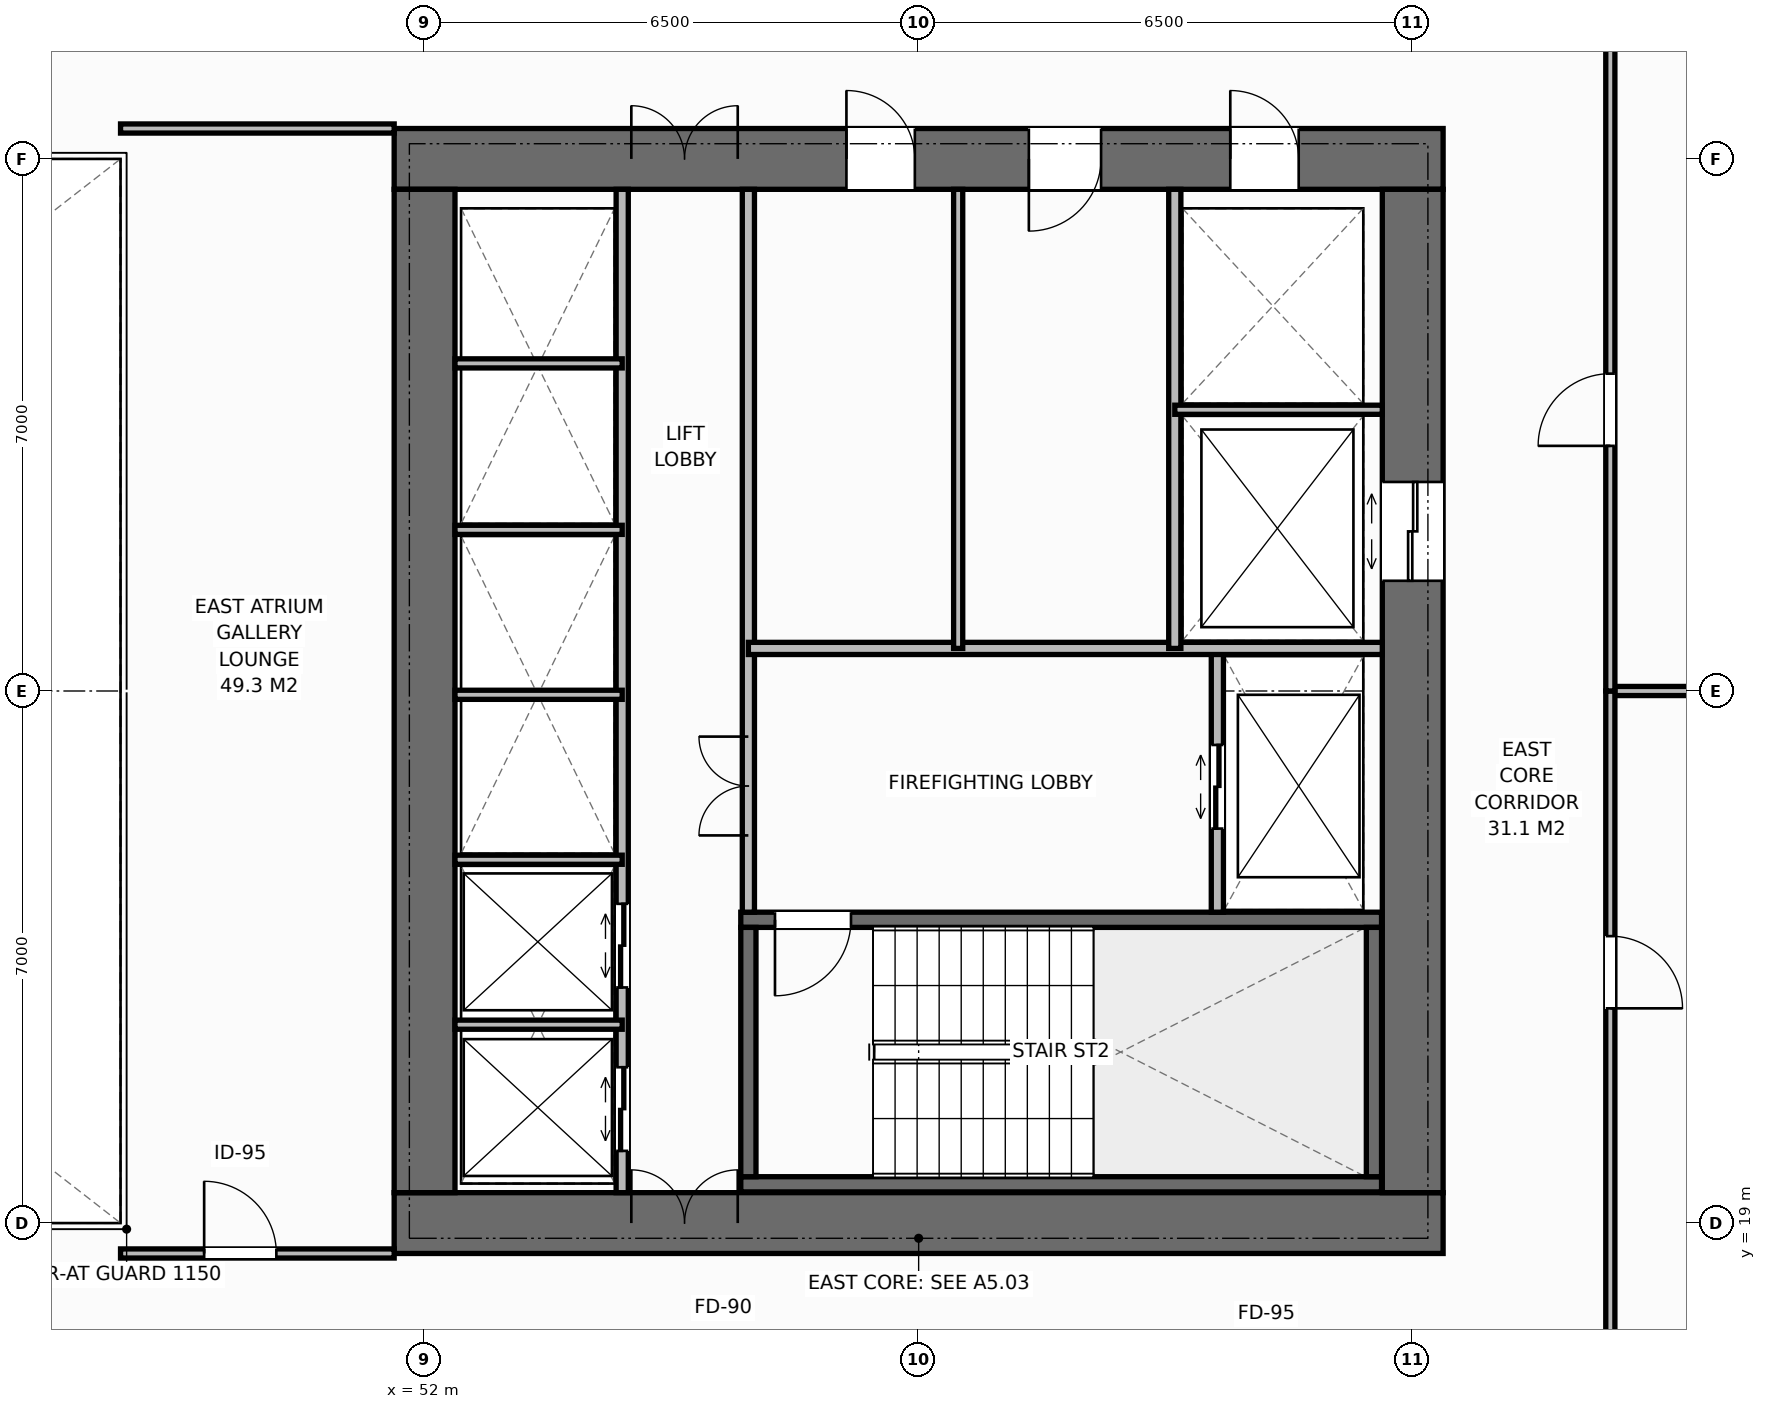
"""IFC4 building model, lengths in metres.
Left out: names, types, materials, properties, quantities, classifications, styles, units other than length and angle.
Written with IfcOpenShell. Run it as: python <this file> out.ifc"""

import sys

from ifc_helpers import new_model, si_unit, direction, frame, frame_2d, origin, place, context, subcontext, project, spatial, rectangle, extrude, element, fill, save


model = new_model("IFC4")
c1 = context("Model", 3, precision=1e-05, world=origin(), true_north=direction((0.0, 1.0)))
c2 = subcontext(c1, "Body", "Model", "MODEL_VIEW")
j1 = project(units=[si_unit("LENGTHUNIT", "METRE"), si_unit("PLANEANGLEUNIT", "RADIAN")], contexts=[c1])
p1 = place(None, origin())
s1 = spatial("IfcSite", under=j1, at=p1, CompositionType="ELEMENT")
p2 = place(p1, origin())
s2 = spatial("IfcBuilding", under=s1, at=p2, CompositionType="ELEMENT")
p3 = place(p2, frame((0.0, 0.0, 65.8)))
s3 = spatial("IfcBuildingStorey", under=s2, at=p3, CompositionType="ELEMENT", Elevation=65.8)
p4 = place(p3, frame((51.6, 19.0, 0.0), z_axis=(0.0, 0.0, 1.0), x_axis=(1.0, 0.0, 0.0)))
e1 = element("IfcWall", 1, at=p4, inside=s3, PredefinedType="SHEAR", context=c2, shape_type="SweptSolid", body=[
    extrude(rectangle(XDim=13.8, YDim=0.8, at=frame_2d((6.9, 0.0))), origin(), (0.0, 0.0, 1.0), 3.8),
])
p5 = place(p4, frame((3.12, 0.0, 0.0)))
e2 = element("IfcOpeningElement", 2, at=p5, cuts=e1, PredefinedType="OPENING", context=c2, shape_type="SweptSolid", body=[
    extrude(rectangle(XDim=1.4, YDim=2.2, at=frame_2d((0.7, 1.1))), frame((0.0, 0.41, 0.0), z_axis=(0.0, -1.0, 0.0), x_axis=(1.0, 0.0, 0.0)), (0.0, 0.0, 1.0), 0.82),
])
p6 = place(p3, frame((51.6, 33.0, 0.0), z_axis=(0.0, 0.0, 1.0), x_axis=(1.0, 0.0, 0.0)))
e3 = element("IfcWall", 3, at=p6, inside=s3, PredefinedType="SHEAR", context=c2, shape_type="SweptSolid", body=[
    extrude(rectangle(XDim=13.8, YDim=0.8, at=frame_2d((6.9, 0.0))), origin(), (0.0, 0.0, 1.0), 3.8),
])
p7 = place(p6, frame((3.12, 0.0, 0.0)))
e4 = element("IfcOpeningElement", 4, at=p7, cuts=e3, PredefinedType="OPENING", context=c2, shape_type="SweptSolid", body=[
    extrude(rectangle(XDim=1.4, YDim=2.2, at=frame_2d((0.7, 1.1))), frame((0.0, 0.41, 0.0), z_axis=(0.0, -1.0, 0.0), x_axis=(1.0, 0.0, 0.0)), (0.0, 0.0, 1.0), 0.82),
])
p8 = place(p6, frame((11.0, 0.0, 0.0)))
e5 = element("IfcOpeningElement", 5, at=p8, cuts=e3, PredefinedType="OPENING", context=c2, shape_type="SweptSolid", body=[
    extrude(rectangle(XDim=0.9, YDim=2.15, at=frame_2d((0.45, 1.075))), frame((0.0, 0.41, 0.0), z_axis=(0.0, -1.0, 0.0), x_axis=(1.0, 0.0, 0.0)), (0.0, 0.0, 1.0), 0.82),
])
p9 = place(p6, frame((5.95, 0.0, 0.0)))
e6 = element("IfcOpeningElement", 6, at=p9, cuts=e3, PredefinedType="OPENING", context=c2, shape_type="SweptSolid", body=[
    extrude(rectangle(XDim=0.9, YDim=2.15, at=frame_2d((0.45, 1.075))), frame((0.0, 0.41, 0.0), z_axis=(0.0, -1.0, 0.0), x_axis=(1.0, 0.0, 0.0)), (0.0, 0.0, 1.0), 0.82),
])
p10 = place(p6, frame((8.35, 0.0, 0.0)))
e7 = element("IfcOpeningElement", 7, at=p10, cuts=e3, PredefinedType="OPENING", context=c2, shape_type="SweptSolid", body=[
    extrude(rectangle(XDim=0.95, YDim=2.15, at=frame_2d((0.475, 1.075))), frame((0.0, 0.41, 0.0), z_axis=(0.0, -1.0, 0.0), x_axis=(1.0, 0.0, 0.0)), (0.0, 0.0, 1.0), 0.82),
])
p11 = place(p3, frame((52.0, 19.4, 0.0), z_axis=(0.0, 0.0, 1.0), x_axis=(0.0, 1.0, 0.0)))
e8 = element("IfcWall", 8, at=p11, inside=s3, PredefinedType="SHEAR", context=c2, shape_type="SweptSolid", body=[
    extrude(rectangle(XDim=13.2, YDim=0.8, at=frame_2d((6.6, 0.0))), origin(), (0.0, 0.0, 1.0), 3.8),
])
p12 = place(p3, frame((65.0, 19.4, 0.0), z_axis=(0.0, 0.0, 1.0), x_axis=(0.0, 1.0, 0.0)))
e9 = element("IfcWall", 9, at=p12, inside=s3, PredefinedType="SHEAR", context=c2, shape_type="SweptSolid", body=[
    extrude(rectangle(XDim=13.2, YDim=0.8, at=frame_2d((6.6, 0.0))), origin(), (0.0, 0.0, 1.0), 3.8),
])
p13 = place(p12, frame((8.05, 0.0, 0.0)))
e10 = element("IfcOpeningElement", 10, at=p13, cuts=e9, PredefinedType="OPENING", context=c2, shape_type="SweptSolid", body=[
    extrude(rectangle(XDim=1.3, YDim=2.2, at=frame_2d((0.65, 1.1))), frame((0.0, 0.41, 0.0), z_axis=(0.0, -1.0, 0.0), x_axis=(1.0, 0.0, 0.0)), (0.0, 0.0, 1.0), 0.82),
])
p14 = place(p3, frame((56.16, 19.51, 0.0), z_axis=(0.0, 0.0, 1.0), x_axis=(1.0, 0.0, 0.0)))
e11 = element("IfcWall", 11, at=p14, inside=s3, PredefinedType="SHEAR", context=c2, shape_type="SweptSolid", body=[
    extrude(rectangle(XDim=8.43, YDim=0.2, at=frame_2d((4.215, 0.0))), origin(), (0.0, 0.0, 1.0), 3.8),
])
p15 = place(p3, frame((56.16, 22.99, 0.0), z_axis=(0.0, 0.0, 1.0), x_axis=(1.0, 0.0, 0.0)))
e12 = element("IfcWall", 12, at=p15, inside=s3, PredefinedType="SHEAR", context=c2, shape_type="SweptSolid", body=[
    extrude(rectangle(XDim=8.43, YDim=0.2, at=frame_2d((4.215, 0.0))), origin(), (0.0, 0.0, 1.0), 3.8),
])
p16 = place(p15, frame((0.45, 0.0, 0.0)))
e13 = element("IfcOpeningElement", 13, at=p16, cuts=e12, PredefinedType="OPENING", context=c2, shape_type="SweptSolid", body=[
    extrude(rectangle(XDim=1.0, YDim=2.15, at=frame_2d((0.5, 1.075))), frame((0.0, 0.11, 0.0), z_axis=(0.0, -1.0, 0.0), x_axis=(1.0, 0.0, 0.0)), (0.0, 0.0, 1.0), 0.22),
])
for number, where, z_axis, x_axis in (
    (14, (56.26, 19.61, 0.0), (0.0, 0.0, 1.0), (0.0, 1.0, 0.0)),
    (15, (64.49, 19.61, 0.0), (0.0, 0.0, 1.0), (0.0, 1.0, 0.0)),
):
    element("IfcWall", number, at=place(p3, frame(where, z_axis=z_axis, x_axis=x_axis)), inside=s3, PredefinedType="SHEAR", context=c2, shape_type="SweptSolid", body=[
        extrude(rectangle(XDim=3.28, YDim=0.2, at=frame_2d((1.64, 0.0))), origin(), (0.0, 0.0, 1.0), 3.8),
    ])
p17 = place(p3, frame((54.6, 19.4, 0.0), z_axis=(0.0, 0.0, 1.0), x_axis=(0.0, 1.0, 0.0)))
e16 = element("IfcWall", 16, at=p17, inside=s3, PredefinedType="STANDARD", context=c2, shape_type="SweptSolid", body=[
    extrude(rectangle(XDim=13.2, YDim=0.16, at=frame_2d((6.6, 0.0))), origin(), (0.0, 0.0, 1.0), 3.55),
])
p18 = place(p17, frame((0.55, 0.0, 0.0)))
e17 = element("IfcOpeningElement", 17, at=p18, cuts=e16, PredefinedType="OPENING", context=c2, shape_type="SweptSolid", body=[
    extrude(rectangle(XDim=1.1, YDim=2.2, at=frame_2d((0.55, 1.1))), frame((0.0, 0.09, 0.0), z_axis=(0.0, -1.0, 0.0), x_axis=(1.0, 0.0, 0.0)), (0.0, 0.0, 1.0), 0.18),
])
p19 = place(p17, frame((2.7, 0.0, 0.0)))
e18 = element("IfcOpeningElement", 18, at=p19, cuts=e16, PredefinedType="OPENING", context=c2, shape_type="SweptSolid", body=[
    extrude(rectangle(XDim=1.1, YDim=2.2, at=frame_2d((0.55, 1.1))), frame((0.0, 0.09, 0.0), z_axis=(0.0, -1.0, 0.0), x_axis=(1.0, 0.0, 0.0)), (0.0, 0.0, 1.0), 0.18),
])
p20 = place(p3, frame((56.26, 23.09, 0.0), z_axis=(0.0, 0.0, 1.0), x_axis=(0.0, 1.0, 0.0)))
e19 = element("IfcWall", 19, at=p20, inside=s3, PredefinedType="STANDARD", context=c2, shape_type="SweptSolid", body=[
    extrude(rectangle(XDim=9.51, YDim=0.16, at=frame_2d((4.755, 0.0))), origin(), (0.0, 0.0, 1.0), 3.55),
])
p21 = place(p20, frame((1.01, 0.0, 0.0)))
e20 = element("IfcOpeningElement", 20, at=p21, cuts=e19, PredefinedType="OPENING", context=c2, shape_type="SweptSolid", body=[
    extrude(rectangle(XDim=1.3, YDim=2.2, at=frame_2d((0.65, 1.1))), frame((0.0, 0.09, 0.0), z_axis=(0.0, -1.0, 0.0), x_axis=(1.0, 0.0, 0.0)), (0.0, 0.0, 1.0), 0.18),
])
for number, where, z_axis, x_axis in (
    (21, (52.4, 21.61, 0.0), (0.0, 0.0, 1.0), (1.0, 0.0, 0.0)),
    (22, (52.4, 23.78, 0.0), (0.0, 0.0, 1.0), (1.0, 0.0, 0.0)),
    (23, (52.4, 25.95, 0.0), (0.0, 0.0, 1.0), (1.0, 0.0, 0.0)),
    (24, (52.4, 28.12, 0.0), (0.0, 0.0, 1.0), (1.0, 0.0, 0.0)),
    (25, (52.4, 30.31, 0.0), (0.0, 0.0, 1.0), (1.0, 0.0, 0.0)),
):
    element("IfcWall", number, at=place(p3, frame(where, z_axis=z_axis, x_axis=x_axis)), inside=s3, PredefinedType="PARTITIONING", context=c2, shape_type="SweptSolid", body=[
        extrude(rectangle(XDim=2.2, YDim=0.12, at=frame_2d((1.1, 0.0))), origin(), (0.0, 0.0, 1.0), 3.55),
    ])
p22 = place(p3, frame((62.43, 23.09, 0.0), z_axis=(0.0, 0.0, 1.0), x_axis=(0.0, 1.0, 0.0)))
e26 = element("IfcWall", 26, at=p22, inside=s3, PredefinedType="STANDARD", context=c2, shape_type="SweptSolid", body=[
    extrude(rectangle(XDim=3.47, YDim=0.16, at=frame_2d((1.735, 0.0))), origin(), (0.0, 0.0, 1.0), 3.55),
])
p23 = place(p22, frame((1.1, 0.0, 0.0)))
e27 = element("IfcOpeningElement", 27, at=p23, cuts=e26, PredefinedType="OPENING", context=c2, shape_type="SweptSolid", body=[
    extrude(rectangle(XDim=1.1, YDim=2.2, at=frame_2d((0.55, 1.1))), frame((0.0, 0.09, 0.0), z_axis=(0.0, -1.0, 0.0), x_axis=(1.0, 0.0, 0.0)), (0.0, 0.0, 1.0), 0.18),
])
p24 = place(p3, frame((56.26, 26.56, 0.0), z_axis=(0.0, 0.0, 1.0), x_axis=(1.0, 0.0, 0.0)))
e28 = element("IfcWall", 28, at=p24, inside=s3, PredefinedType="STANDARD", context=c2, shape_type="SweptSolid", body=[
    extrude(rectangle(XDim=8.34, YDim=0.16, at=frame_2d((4.17, 0.0))), origin(), (0.0, 0.0, 1.0), 3.55),
])
p25 = place(p3, frame((61.87, 26.56, 0.0), z_axis=(0.0, 0.0, 1.0), x_axis=(0.0, 1.0, 0.0)))
e29 = element("IfcWall", 29, at=p25, inside=s3, PredefinedType="STANDARD", context=c2, shape_type="SweptSolid", body=[
    extrude(rectangle(XDim=6.04, YDim=0.16, at=frame_2d((3.02, 0.0))), origin(), (0.0, 0.0, 1.0), 3.55),
])
p26 = place(p3, frame((61.87, 29.7, 0.0), z_axis=(0.0, 0.0, 1.0), x_axis=(1.0, 0.0, 0.0)))
e30 = element("IfcWall", 30, at=p26, inside=s3, PredefinedType="PARTITIONING", context=c2, shape_type="SweptSolid", body=[
    extrude(rectangle(XDim=2.73, YDim=0.12, at=frame_2d((1.365, 0.0))), origin(), (0.0, 0.0, 1.0), 3.55),
])
p27 = place(p3, frame((59.02, 26.56, 0.0), z_axis=(0.0, 0.0, 1.0), x_axis=(0.0, 1.0, 0.0)))
e31 = element("IfcWall", 31, at=p27, inside=s3, PredefinedType="PARTITIONING", context=c2, shape_type="SweptSolid", body=[
    extrude(rectangle(XDim=6.04, YDim=0.12, at=frame_2d((3.02, 0.0))), origin(), (0.0, 0.0, 1.0), 3.55),
])
p28 = place(p3, frame((48.0, 33.4, 0.0), z_axis=(0.0, 0.0, 1.0), x_axis=(1.0, 0.0, 0.0)))
e32 = element("IfcWall", 32, at=p28, inside=s3, PredefinedType="PARTITIONING", context=c2, shape_type="SweptSolid", body=[
    extrude(rectangle(XDim=3.6, YDim=0.12, at=frame_2d((1.8, 0.0))), origin(), (0.0, 0.0, 1.0), 3.55),
])
p29 = place(p3, frame((48.0, 18.6, 0.0), z_axis=(0.0, 0.0, 1.0), x_axis=(1.0, 0.0, 0.0)))
e33 = element("IfcWall", 33, at=p29, inside=s3, PredefinedType="PARTITIONING", context=c2, shape_type="SweptSolid", body=[
    extrude(rectangle(XDim=3.6, YDim=0.12, at=frame_2d((1.8, 0.0))), origin(), (0.0, 0.0, 1.0), 3.55),
])
p30 = place(p29, frame((1.1, 0.0, 0.0)))
e34 = element("IfcOpeningElement", 34, at=p30, cuts=e33, PredefinedType="OPENING", context=c2, shape_type="SweptSolid", body=[
    extrude(rectangle(XDim=0.95, YDim=2.15, at=frame_2d((0.475, 1.075))), frame((0.0, 0.07, 0.0), z_axis=(0.0, -1.0, 0.0), x_axis=(1.0, 0.0, 0.0)), (0.0, 0.0, 1.0), 0.14),
])
p31 = place(p3, frame((67.6, 26.0, 0.0), z_axis=(0.0, 0.0, 1.0), x_axis=(1.0, 0.0, 0.0)))
e35 = element("IfcWall", 35, at=p31, inside=s3, PredefinedType="PARTITIONING", context=c2, shape_type="SweptSolid", body=[
    extrude(rectangle(XDim=10.58, YDim=0.12, at=frame_2d((5.29, 0.0))), origin(), (0.0, 0.0, 1.0), 3.55),
])
p32 = place(p3, frame((67.6, 16.5, 0.0), z_axis=(0.0, 0.0, 1.0), x_axis=(0.0, 1.0, 0.0)))
e36 = element("IfcWall", 36, at=p32, inside=s3, PredefinedType="PARTITIONING", context=c2, shape_type="SweptSolid", body=[
    extrude(rectangle(XDim=9.5, YDim=0.12, at=frame_2d((4.75, 0.0))), origin(), (0.0, 0.0, 1.0), 3.55),
])
p33 = place(p32, frame((5.325, 0.0, 0.0)))
e37 = element("IfcOpeningElement", 37, at=p33, cuts=e36, PredefinedType="OPENING", context=c2, shape_type="SweptSolid", body=[
    extrude(rectangle(XDim=0.95, YDim=2.15, at=frame_2d((0.475, 1.075))), frame((0.0, 0.07, 0.0), z_axis=(0.0, -1.0, 0.0), x_axis=(1.0, 0.0, 0.0)), (0.0, 0.0, 1.0), 0.14),
])
p34 = place(p3, frame((67.6, 26.0, 0.0), z_axis=(0.0, 0.0, 1.0), x_axis=(0.0, 1.0, 0.0)))
e38 = element("IfcWall", 38, at=p34, inside=s3, PredefinedType="PARTITIONING", context=c2, shape_type="SweptSolid", body=[
    extrude(rectangle(XDim=9.5, YDim=0.12, at=frame_2d((4.75, 0.0))), origin(), (0.0, 0.0, 1.0), 3.55),
])
p35 = place(p34, frame((3.225, 0.0, 0.0)))
e39 = element("IfcOpeningElement", 39, at=p35, cuts=e38, PredefinedType="OPENING", context=c2, shape_type="SweptSolid", body=[
    extrude(rectangle(XDim=0.95, YDim=2.15, at=frame_2d((0.475, 1.075))), frame((0.0, 0.07, 0.0), z_axis=(0.0, -1.0, 0.0), x_axis=(1.0, 0.0, 0.0)), (0.0, 0.0, 1.0), 0.14),
])
p36 = place(p5, origin())
e40 = element("IfcDoor", 40, at=p36, inside=s3, OperationType="DOUBLE_DOOR_SINGLE_SWING", PredefinedType="DOOR", context=c2, shape_type="SweptSolid", body=[
    extrude(rectangle(XDim=1.4, YDim=2.2, at=frame_2d((0.7, 1.1))), frame((0.0, 0.125, 0.0), z_axis=(0.0, -1.0, 0.0), x_axis=(1.0, 0.0, 0.0)), (0.0, 0.0, 1.0), 0.05),
])
fill(e2, e40)
p37 = place(p7, origin())
e41 = element("IfcDoor", 41, at=p37, inside=s3, OperationType="DOUBLE_DOOR_SINGLE_SWING", PredefinedType="DOOR", context=c2, shape_type="SweptSolid", body=[
    extrude(rectangle(XDim=1.4, YDim=2.2, at=frame_2d((0.7, 1.1))), frame((0.0, -0.075, 0.0), z_axis=(0.0, -1.0, 0.0), x_axis=(1.0, 0.0, 0.0)), (0.0, 0.0, 1.0), 0.05),
])
fill(e4, e41)
p38 = place(p18, origin())
e42 = element("IfcDoor", 42, at=p38, inside=s3, OperationType="DOUBLE_DOOR_SLIDING", PredefinedType="DOOR", context=c2, shape_type="SweptSolid", body=[
    extrude(rectangle(XDim=1.1, YDim=2.2, at=frame_2d((0.55, 1.1))), frame((0.0, 0.025, 0.0), z_axis=(0.0, -1.0, 0.0), x_axis=(1.0, 0.0, 0.0)), (0.0, 0.0, 1.0), 0.05),
])
fill(e17, e42)
p39 = place(p19, origin())
e43 = element("IfcDoor", 43, at=p39, inside=s3, OperationType="DOUBLE_DOOR_SLIDING", PredefinedType="DOOR", context=c2, shape_type="SweptSolid", body=[
    extrude(rectangle(XDim=1.1, YDim=2.2, at=frame_2d((0.55, 1.1))), frame((0.0, 0.025, 0.0), z_axis=(0.0, -1.0, 0.0), x_axis=(1.0, 0.0, 0.0)), (0.0, 0.0, 1.0), 0.05),
])
fill(e18, e43)
p40 = place(p16, origin())
e44 = element("IfcDoor", 44, at=p40, inside=s3, OperationType="SINGLE_SWING_RIGHT", PredefinedType="DOOR", context=c2, shape_type="SweptSolid", body=[
    extrude(rectangle(XDim=1.0, YDim=2.15, at=frame_2d((0.5, 1.075))), frame((0.0, 0.025, 0.0), z_axis=(0.0, -1.0, 0.0), x_axis=(1.0, 0.0, 0.0)), (0.0, 0.0, 1.0), 0.05),
])
fill(e13, e44)
p41 = place(p23, origin())
e45 = element("IfcDoor", 45, at=p41, inside=s3, OperationType="DOUBLE_DOOR_SLIDING", PredefinedType="DOOR", context=c2, shape_type="SweptSolid", body=[
    extrude(rectangle(XDim=1.1, YDim=2.2, at=frame_2d((0.55, 1.1))), frame((0.0, 0.025, 0.0), z_axis=(0.0, -1.0, 0.0), x_axis=(1.0, 0.0, 0.0)), (0.0, 0.0, 1.0), 0.05),
])
fill(e27, e45)
p42 = place(p21, origin())
e46 = element("IfcDoor", 46, at=p42, inside=s3, OperationType="DOUBLE_DOOR_SINGLE_SWING", PredefinedType="DOOR", context=c2, shape_type="SweptSolid", body=[
    extrude(rectangle(XDim=1.3, YDim=2.2, at=frame_2d((0.65, 1.1))), frame((0.0, 0.025, 0.0), z_axis=(0.0, -1.0, 0.0), x_axis=(1.0, 0.0, 0.0)), (0.0, 0.0, 1.0), 0.05),
])
fill(e20, e46)
p43 = place(p13, origin())
e47 = element("IfcDoor", 47, at=p43, inside=s3, OperationType="DOUBLE_DOOR_SLIDING", PredefinedType="DOOR", context=c2, shape_type="SweptSolid", body=[
    extrude(rectangle(XDim=1.3, YDim=2.2, at=frame_2d((0.65, 1.1))), frame((0.0, 0.025, 0.0), z_axis=(0.0, -1.0, 0.0), x_axis=(1.0, 0.0, 0.0)), (0.0, 0.0, 1.0), 0.05),
])
fill(e10, e47)
p44 = place(p8, origin())
e48 = element("IfcDoor", 48, at=p44, inside=s3, OperationType="SINGLE_SWING_LEFT", PredefinedType="DOOR", context=c2, shape_type="SweptSolid", body=[
    extrude(rectangle(XDim=0.9, YDim=2.15, at=frame_2d((0.45, 1.075))), frame((0.0, -0.075, 0.0), z_axis=(0.0, -1.0, 0.0), x_axis=(1.0, 0.0, 0.0)), (0.0, 0.0, 1.0), 0.05),
])
fill(e5, e48)
p45 = place(p9, origin())
e49 = element("IfcDoor", 49, at=p45, inside=s3, OperationType="SINGLE_SWING_LEFT", PredefinedType="DOOR", context=c2, shape_type="SweptSolid", body=[
    extrude(rectangle(XDim=0.9, YDim=2.15, at=frame_2d((0.45, 1.075))), frame((0.0, -0.075, 0.0), z_axis=(0.0, -1.0, 0.0), x_axis=(1.0, 0.0, 0.0)), (0.0, 0.0, 1.0), 0.05),
])
fill(e6, e49)
p46 = place(p10, origin())
e50 = element("IfcDoor", 50, at=p46, inside=s3, OperationType="SINGLE_SWING_RIGHT", PredefinedType="DOOR", context=c2, shape_type="SweptSolid", body=[
    extrude(rectangle(XDim=0.95, YDim=2.15, at=frame_2d((0.475, 1.075))), frame((0.0, -0.075, 0.0), z_axis=(0.0, -1.0, 0.0), x_axis=(1.0, 0.0, 0.0)), (0.0, 0.0, 1.0), 0.05),
])
fill(e7, e50)
p47 = place(p30, origin())
e51 = element("IfcDoor", 51, at=p47, inside=s3, OperationType="SINGLE_SWING_LEFT", PredefinedType="DOOR", context=c2, shape_type="SweptSolid", body=[
    extrude(rectangle(XDim=0.95, YDim=2.15, at=frame_2d((0.475, 1.075))), frame((0.0, 0.025, 0.0), z_axis=(0.0, -1.0, 0.0), x_axis=(1.0, 0.0, 0.0)), (0.0, 0.0, 1.0), 0.05),
])
fill(e34, e51)
p48 = place(p33, origin())
e52 = element("IfcDoor", 52, at=p48, inside=s3, OperationType="SINGLE_SWING_RIGHT", PredefinedType="DOOR", context=c2, shape_type="SweptSolid", body=[
    extrude(rectangle(XDim=0.95, YDim=2.15, at=frame_2d((0.475, 1.075))), frame((0.0, 0.025, 0.0), z_axis=(0.0, -1.0, 0.0), x_axis=(1.0, 0.0, 0.0)), (0.0, 0.0, 1.0), 0.05),
])
fill(e37, e52)
p49 = place(p35, origin())
e53 = element("IfcDoor", 53, at=p49, inside=s3, OperationType="SINGLE_SWING_LEFT", PredefinedType="DOOR", context=c2, shape_type="SweptSolid", body=[
    extrude(rectangle(XDim=0.95, YDim=2.15, at=frame_2d((0.475, 1.075))), frame((0.0, 0.025, 0.0), z_axis=(0.0, -1.0, 0.0), x_axis=(1.0, 0.0, 0.0)), (0.0, 0.0, 1.0), 0.05),
])
fill(e39, e53)
save(model, sys.argv[1])
